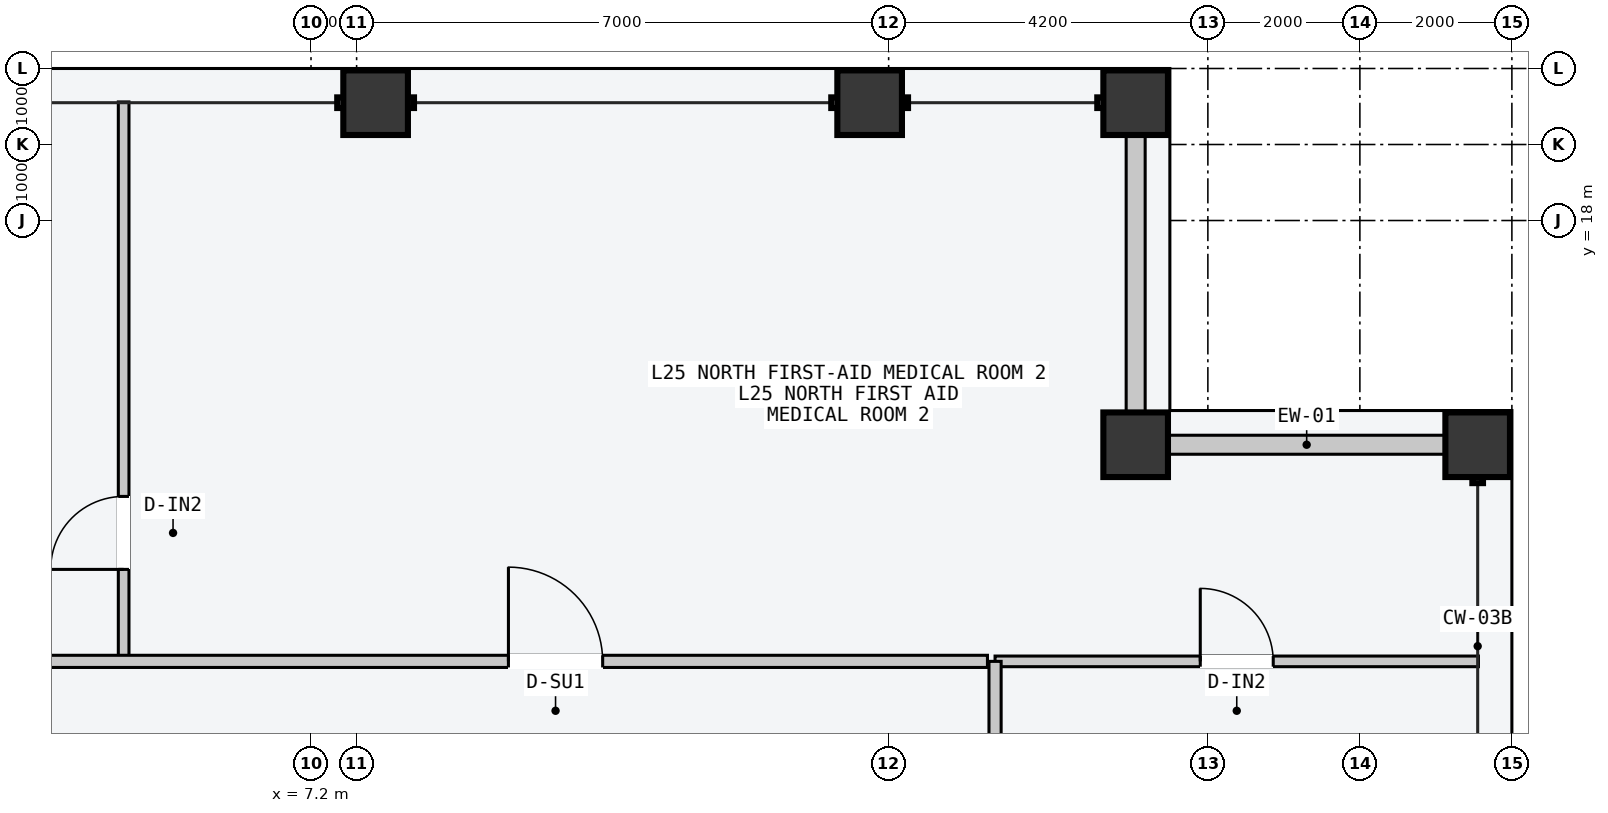
"""IFC4 building model, lengths in metres.
Left out: names, types, materials, properties, quantities, classifications, styles, units other than length and angle.
Written with IfcOpenShell. Run it as: python <this file> out.ifc"""

import sys

from ifc_helpers import new_model, si_unit, direction, frame, frame_2d, origin, origin_2d, place, context, subcontext, project, spatial, rectangle, hollow_rectangle, extrude, element, fill, save


model = new_model("IFC4")
c1 = context("Model", 3, precision=1e-05, world=origin(), true_north=direction((0.0, 1.0)))
c2 = subcontext(c1, "Body", "Model", "MODEL_VIEW")
j1 = project(units=[si_unit("LENGTHUNIT", "METRE"), si_unit("PLANEANGLEUNIT", "RADIAN")], contexts=[c1])
p1 = place(None, origin())
s1 = spatial("IfcSite", under=j1, at=p1, CompositionType="ELEMENT")
p2 = place(p1, origin())
s2 = spatial("IfcBuilding", under=s1, at=p2, CompositionType="ELEMENT")
p3 = place(p2, frame((0.0, 0.0, 99.0)))
s3 = spatial("IfcBuildingStorey", under=s2, at=p3, CompositionType="ELEMENT", Elevation=99.0)
for number, where, z_axis, x_axis in (
    (1, (8.05, 19.55, 0.0), (0.0, 0.0, 1.0), (1.0, 0.0, 0.0)),
    (2, (14.55, 19.55, 0.0), (0.0, 0.0, 1.0), (1.0, 0.0, 0.0)),
    (3, (18.05, 19.55, 0.0), (0.0, 0.0, 1.0), (1.0, 0.0, 0.0)),
    (4, (22.55, 15.05, 0.0), (0.0, 0.0, 1.0), (0.0, 1.0, 0.0)),
    (5, (18.05, 15.05, 0.0), (0.0, 0.0, 1.0), (1.0, 0.0, 0.0)),
):
    element("IfcColumn", number, at=place(p3, frame(where, z_axis=z_axis, x_axis=x_axis)), inside=s3, PredefinedType="COLUMN", context=c2, shape_type="SweptSolid", body=[
        extrude(hollow_rectangle(XDim=0.85, YDim=0.85, WallThickness=0.04, at=origin_2d()), origin(), (0.0, 0.0, 1.0), 3.6),
    ])
for number, where, z_axis, x_axis in (
    (6, (18.485, 15.05, 0.0), (0.0, 0.0, 1.0), (1.0, 0.0, 0.0)),
    (7, (18.05, 15.485, 0.0), (0.0, 0.0, 1.0), (0.0, 1.0, 0.0)),
):
    element("IfcWall", number, at=place(p3, frame(where, z_axis=z_axis, x_axis=x_axis)), inside=s3, PredefinedType="STANDARD", context=c2, shape_type="SweptSolid", body=[
        extrude(rectangle(XDim=3.63, YDim=0.25, at=frame_2d((1.815, 0.0))), origin(), (0.0, 0.0, 1.0), 2.75),
    ])
p4 = place(p3, frame((4.735, 12.26, 0.0), z_axis=(0.0, 0.0, 1.0), x_axis=(0.0, 1.0, 0.0)))
e8 = element("IfcWall", 8, at=p4, inside=s3, PredefinedType="PARTITIONING", context=c2, shape_type="SweptSolid", body=[
    extrude(rectangle(XDim=7.3, YDim=0.14, at=frame_2d((3.65, 0.0))), origin(), (0.0, 0.0, 1.0), 3.4),
])
p5 = place(p4, frame((1.15, 0.0, 0.0)))
e9 = element("IfcOpeningElement", 9, at=p5, cuts=e8, PredefinedType="OPENING", context=c2, shape_type="SweptSolid", body=[
    extrude(rectangle(XDim=0.96, YDim=2.18, at=frame_2d((0.48, 1.09))), frame((0.0, 0.08, 0.0), z_axis=(0.0, -1.0, 0.0), x_axis=(1.0, 0.0, 0.0)), (0.0, 0.0, 1.0), 0.16),
])
p6 = place(p3, frame((-16.1, 12.2, 0.0), z_axis=(0.0, 0.0, 1.0), x_axis=(1.0, 0.0, 0.0)))
e10 = element("IfcWall", 10, at=p6, inside=s3, PredefinedType="PARTITIONING", context=c2, shape_type="SweptSolid", body=[
    extrude(rectangle(XDim=32.2, YDim=0.16, at=frame_2d((16.1, 0.0))), origin(), (0.0, 0.0, 1.0), 3.4),
])
p7 = place(p6, frame((9.887, 0.0, 0.0)))
e11 = element("IfcOpeningElement", 11, at=p7, cuts=e10, PredefinedType="OPENING", context=c2, shape_type="SweptSolid", body=[
    extrude(rectangle(XDim=1.06, YDim=2.2, at=frame_2d((0.53, 1.1))), frame((0.0, 0.09, 0.0), z_axis=(0.0, -1.0, 0.0), x_axis=(1.0, 0.0, 0.0)), (0.0, 0.0, 1.0), 0.18),
])
p8 = place(p6, frame((25.897, 0.0, 0.0)))
e12 = element("IfcOpeningElement", 12, at=p8, cuts=e10, PredefinedType="OPENING", context=c2, shape_type="SweptSolid", body=[
    extrude(rectangle(XDim=1.24, YDim=2.24, at=frame_2d((0.62, 1.12))), frame((0.0, 0.09, 0.0), z_axis=(0.0, -1.0, 0.0), x_axis=(1.0, 0.0, 0.0)), (0.0, 0.0, 1.0), 0.18),
])
p9 = place(p3, frame((16.2, 12.2, 0.0), z_axis=(0.0, 0.0, 1.0), x_axis=(1.0, 0.0, 0.0)))
e13 = element("IfcWall", 13, at=p9, inside=s3, PredefinedType="PARTITIONING", context=c2, shape_type="SweptSolid", body=[
    extrude(rectangle(XDim=6.36, YDim=0.14, at=frame_2d((3.18, 0.0))), origin(), (0.0, 0.0, 1.0), 3.4),
])
p10 = place(p9, frame((2.7, 0.0, 0.0)))
e14 = element("IfcOpeningElement", 14, at=p10, cuts=e13, PredefinedType="OPENING", context=c2, shape_type="SweptSolid", body=[
    extrude(rectangle(XDim=0.96, YDim=2.18, at=frame_2d((0.48, 1.09))), frame((0.0, 0.08, 0.0), z_axis=(0.0, -1.0, 0.0), x_axis=(1.0, 0.0, 0.0)), (0.0, 0.0, 1.0), 0.16),
])
p11 = place(p3, frame((16.2, 10.25, 0.0), z_axis=(0.0, 0.0, 1.0), x_axis=(0.0, 1.0, 0.0)))
e15 = element("IfcWall", 15, at=p11, inside=s3, PredefinedType="PARTITIONING", context=c2, shape_type="SweptSolid", body=[
    extrude(rectangle(XDim=1.95, YDim=0.16, at=frame_2d((0.975, 0.0))), origin(), (0.0, 0.0, 1.0), 3.4),
])
p12 = place(p5, origin())
e16 = element("IfcDoor", 16, at=p12, inside=s3, OperationType="SINGLE_SWING_LEFT", PredefinedType="DOOR", context=c2, shape_type="SweptSolid", body=[
    extrude(rectangle(XDim=0.96, YDim=2.18, at=frame_2d((0.48, 1.09))), frame((0.0, 0.025, 0.0), z_axis=(0.0, -1.0, 0.0), x_axis=(1.0, 0.0, 0.0)), (0.0, 0.0, 1.0), 0.05),
])
fill(e9, e16)
p13 = place(p8, origin())
e17 = element("IfcDoor", 17, at=p13, inside=s3, OperationType="SINGLE_SWING_LEFT", PredefinedType="DOOR", context=c2, shape_type="SweptSolid", body=[
    extrude(rectangle(XDim=1.24, YDim=2.24, at=frame_2d((0.62, 1.12))), frame((0.0, 0.025, 0.0), z_axis=(0.0, -1.0, 0.0), x_axis=(1.0, 0.0, 0.0)), (0.0, 0.0, 1.0), 0.05),
])
fill(e12, e17)
p14 = place(p10, origin())
e18 = element("IfcDoor", 18, at=p14, inside=s3, OperationType="SINGLE_SWING_LEFT", PredefinedType="DOOR", context=c2, shape_type="SweptSolid", body=[
    extrude(rectangle(XDim=0.96, YDim=2.18, at=frame_2d((0.48, 1.09))), frame((0.0, 0.025, 0.0), z_axis=(0.0, -1.0, 0.0), x_axis=(1.0, 0.0, 0.0)), (0.0, 0.0, 1.0), 0.05),
])
fill(e14, e18)
save(model, sys.argv[1])
